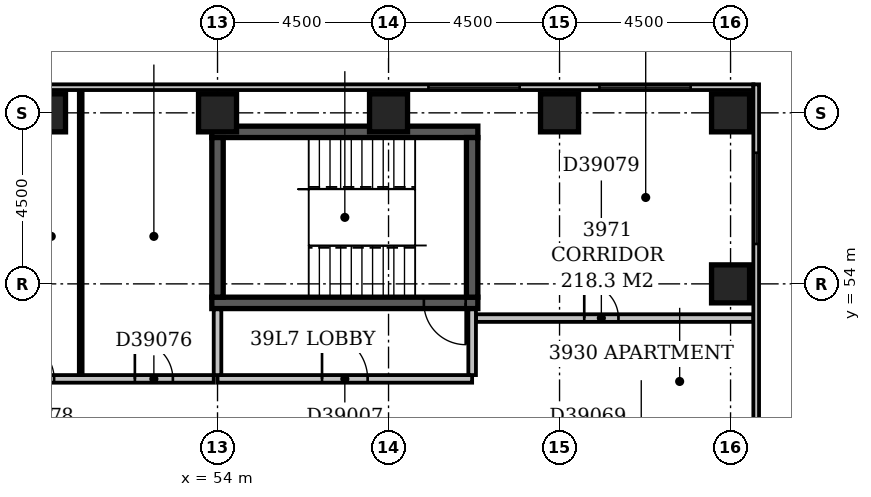
"""IFC4 building model, lengths in metres.
Left out: names, types, materials, properties, quantities, classifications, styles, units other than length and angle.
Written with IfcOpenShell. Run it as: python <this file> out.ifc"""

import sys

from ifc_helpers import new_model, si_unit, direction, frame, frame_2d, origin, origin_2d, place, context, subcontext, project, spatial, rectangle, extrude, element, fill, save


model = new_model("IFC4")
c1 = context("Model", 3, precision=1e-05, world=origin(), true_north=direction((0.0, 1.0)))
c2 = subcontext(c1, "Body", "Model", "MODEL_VIEW")
j1 = project(units=[si_unit("LENGTHUNIT", "METRE"), si_unit("PLANEANGLEUNIT", "RADIAN")], contexts=[c1])
p1 = place(None, origin())
s1 = spatial("IfcSite", under=j1, at=p1, CompositionType="ELEMENT")
p2 = place(p1, origin())
s2 = spatial("IfcBuilding", under=s1, at=p2, CompositionType="ELEMENT")
p3 = place(p2, frame((0.0, 0.0, 155.6)))
s3 = spatial("IfcBuildingStorey", under=s2, at=p3, CompositionType="ELEMENT", Elevation=155.6)
p4 = place(p3, frame((53.85, 53.5, -0.3), z_axis=(0.0, 0.0, 1.0), x_axis=(1.0, 0.0, 0.0)))
e1 = element("IfcWall", 1, at=p4, inside=s3, PredefinedType="SHEAR", context=c2, shape_type="SweptSolid", body=[
    extrude(rectangle(XDim=7.0, YDim=0.3, at=frame_2d((3.5, 0.0))), origin(), (0.0, 0.0, 1.0), 3.6),
])
p5 = place(p4, frame((5.58, 0.0, 0.3)))
e2 = element("IfcOpeningElement", 2, at=p5, cuts=e1, PredefinedType="OPENING", context=c2, shape_type="SweptSolid", body=[
    extrude(rectangle(XDim=1.1, YDim=2.1, at=frame_2d((0.55, 1.05))), frame((0.0, 0.162, 0.0), z_axis=(0.0, -1.0, 0.0), x_axis=(1.0, 0.0, 0.0)), (0.0, 0.0, 1.0), 0.324),
])
p6 = place(p3, frame((53.85, 58.0, -0.3), z_axis=(0.0, 0.0, 1.0), x_axis=(1.0, 0.0, 0.0)))
e3 = element("IfcWall", 3, at=p6, inside=s3, PredefinedType="SHEAR", context=c2, shape_type="SweptSolid", body=[
    extrude(rectangle(XDim=7.0, YDim=0.3, at=frame_2d((3.5, 0.0))), origin(), (0.0, 0.0, 1.0), 3.6),
])
for number, where, z_axis, x_axis in (
    (4, (54.0, 53.65, -0.3), (0.0, 0.0, 1.0), (0.0, 1.0, 0.0)),
    (5, (60.7, 53.65, -0.3), (0.0, 0.0, 1.0), (0.0, 1.0, 0.0)),
):
    element("IfcWall", number, at=place(p3, frame(where, z_axis=z_axis, x_axis=x_axis)), inside=s3, PredefinedType="SHEAR", context=c2, shape_type="SweptSolid", body=[
        extrude(rectangle(XDim=4.2, YDim=0.3, at=frame_2d((2.1, 0.0))), origin(), (0.0, 0.0, 1.0), 3.6),
    ])
for number, where, z_axis, x_axis in (
    (6, (67.5, 54.0, -0.3), (0.0, 0.0, 1.0), (1.0, 0.0, 0.0)),
    (7, (49.5, 58.5, -0.3), (0.0, 0.0, 1.0), (1.0, 0.0, 0.0)),
    (8, (54.0, 58.5, -0.3), (0.0, 0.0, 1.0), (1.0, 0.0, 0.0)),
    (9, (58.5, 58.5, -0.3), (0.0, 0.0, 1.0), (1.0, 0.0, 0.0)),
    (10, (63.0, 58.5, -0.3), (0.0, 0.0, 1.0), (1.0, 0.0, 0.0)),
    (11, (67.5, 58.5, -0.3), (0.0, 0.0, 1.0), (1.0, 0.0, 0.0)),
):
    element("IfcColumn", number, at=place(p3, frame(where, z_axis=z_axis, x_axis=x_axis)), inside=s3, PredefinedType="COLUMN", context=c2, shape_type="SweptSolid", body=[
        extrude(rectangle(XDim=1.0, YDim=1.0, at=origin_2d()), origin(), (0.0, 0.0, 1.0), 3.6),
    ])
p7 = place(p3, frame((68.175, 35.4, 0.0), z_axis=(0.0, 0.0, 1.0), x_axis=(0.0, 1.0, 0.0)))
e12 = element("IfcWall", 12, at=p7, inside=s3, PredefinedType="STANDARD", context=c2, shape_type="SweptSolid", body=[
    extrude(rectangle(XDim=23.85, YDim=0.15, at=frame_2d((11.925, 0.0))), origin(), (0.0, 0.0, 1.0), 2.7),
])
p8 = place(p7, frame((1.65, 0.0, 0.6)))
e13 = element("IfcOpeningElement", 13, at=p8, cuts=e12, PredefinedType="OPENING", context=c2, shape_type="SweptSolid", body=[
    extrude(rectangle(XDim=2.4, YDim=1.8, at=frame_2d((1.2, 0.9))), frame((0.0, 0.087, 0.0), z_axis=(0.0, -1.0, 0.0), x_axis=(1.0, 0.0, 0.0)), (0.0, 0.0, 1.0), 0.174),
])
p9 = place(p7, frame((19.65, 0.0, 0.6)))
e14 = element("IfcOpeningElement", 14, at=p9, cuts=e12, PredefinedType="OPENING", context=c2, shape_type="SweptSolid", body=[
    extrude(rectangle(XDim=2.4, YDim=1.8, at=frame_2d((1.2, 0.9))), frame((0.0, 0.087, 0.0), z_axis=(0.0, -1.0, 0.0), x_axis=(1.0, 0.0, 0.0)), (0.0, 0.0, 1.0), 0.174),
])
p10 = place(p3, frame((68.1, 59.175, 0.0), z_axis=(0.0, 0.0, 1.0), x_axis=(-1.0, 0.0, 0.0)))
e15 = element("IfcWall", 15, at=p10, inside=s3, PredefinedType="STANDARD", context=c2, shape_type="SweptSolid", body=[
    extrude(rectangle(XDim=68.85, YDim=0.15, at=frame_2d((34.425, 0.0))), origin(), (0.0, 0.0, 1.0), 2.7),
])
p11 = place(p10, frame((1.65, 0.0, 0.6)))
e16 = element("IfcOpeningElement", 16, at=p11, cuts=e15, PredefinedType="OPENING", context=c2, shape_type="SweptSolid", body=[
    extrude(rectangle(XDim=2.4, YDim=1.8, at=frame_2d((1.2, 0.9))), frame((0.0, 0.087, 0.0), z_axis=(0.0, -1.0, 0.0), x_axis=(1.0, 0.0, 0.0)), (0.0, 0.0, 1.0), 0.174),
])
p12 = place(p10, frame((6.15, 0.0, 0.6)))
e17 = element("IfcOpeningElement", 17, at=p12, cuts=e15, PredefinedType="OPENING", context=c2, shape_type="SweptSolid", body=[
    extrude(rectangle(XDim=2.4, YDim=1.8, at=frame_2d((1.2, 0.9))), frame((0.0, 0.087, 0.0), z_axis=(0.0, -1.0, 0.0), x_axis=(1.0, 0.0, 0.0)), (0.0, 0.0, 1.0), 0.174),
])
p13 = place(p10, frame((38.847, 0.0, 0.6)))
e18 = element("IfcOpeningElement", 18, at=p13, cuts=e15, PredefinedType="OPENING", context=c2, shape_type="SweptSolid", body=[
    extrude(rectangle(XDim=1.5, YDim=1.8, at=frame_2d((0.75, 0.9))), frame((0.0, 0.087, 0.0), z_axis=(0.0, -1.0, 0.0), x_axis=(1.0, 0.0, 0.0)), (0.0, 0.0, 1.0), 0.174),
])
p14 = place(p3, frame((54.0, 51.5, 0.0), z_axis=(0.0, 0.0, 1.0), x_axis=(1.0, 0.0, 0.0)))
e19 = element("IfcWall", 19, at=p14, inside=s3, PredefinedType="PARTITIONING", context=c2, shape_type="SweptSolid", body=[
    extrude(rectangle(XDim=6.7, YDim=0.2, at=frame_2d((3.35, 0.0))), origin(), (0.0, 0.0, 1.0), 3.3),
])
p15 = place(p14, frame((2.75, 0.0, 0.0)))
e20 = element("IfcOpeningElement", 20, at=p15, cuts=e19, PredefinedType="OPENING", context=c2, shape_type="SweptSolid", body=[
    extrude(rectangle(XDim=1.2, YDim=2.1, at=frame_2d((0.6, 1.05))), frame((0.0, 0.112, 0.0), z_axis=(0.0, -1.0, 0.0), x_axis=(1.0, 0.0, 0.0)), (0.0, 0.0, 1.0), 0.224),
])
p16 = place(p3, frame((60.7, 51.6, 0.0), z_axis=(0.0, 0.0, 1.0), x_axis=(0.0, 1.0, 0.0)))
e21 = element("IfcWall", 21, at=p16, inside=s3, PredefinedType="PARTITIONING", context=c2, shape_type="SweptSolid", body=[
    extrude(rectangle(XDim=1.73, YDim=0.2, at=frame_2d((0.865, 0.0))), origin(), (0.0, 0.0, 1.0), 3.3),
])
p17 = place(p3, frame((54.0, 51.6, 0.0), z_axis=(0.0, 0.0, 1.0), x_axis=(0.0, 1.0, 0.0)))
e22 = element("IfcWall", 22, at=p17, inside=s3, PredefinedType="PARTITIONING", context=c2, shape_type="SweptSolid", body=[
    extrude(rectangle(XDim=1.73, YDim=0.2, at=frame_2d((0.865, 0.0))), origin(), (0.0, 0.0, 1.0), 2.6),
])
p18 = place(p3, frame((44.1, 51.5, 0.0), z_axis=(0.0, 0.0, 1.0), x_axis=(1.0, 0.0, 0.0)))
e23 = element("IfcWall", 23, at=p18, inside=s3, PredefinedType="PARTITIONING", context=c2, shape_type="SweptSolid", body=[
    extrude(rectangle(XDim=9.8, YDim=0.2, at=frame_2d((4.9, 0.0))), origin(), (0.0, 0.0, 1.0), 3.3),
])
p19 = place(p18, frame((7.725, 0.0, 0.0)))
e24 = element("IfcOpeningElement", 24, at=p19, cuts=e23, PredefinedType="OPENING", context=c2, shape_type="SweptSolid", body=[
    extrude(rectangle(XDim=1.0, YDim=2.1, at=frame_2d((0.5, 1.05))), frame((0.0, 0.112, 0.0), z_axis=(0.0, -1.0, 0.0), x_axis=(1.0, 0.0, 0.0)), (0.0, 0.0, 1.0), 0.224),
])
p20 = place(p18, frame((1.075, 0.0, 0.0)))
e25 = element("IfcOpeningElement", 25, at=p20, cuts=e23, PredefinedType="OPENING", context=c2, shape_type="SweptSolid", body=[
    extrude(rectangle(XDim=1.0, YDim=2.1, at=frame_2d((0.5, 1.05))), frame((0.0, 0.112, 0.0), z_axis=(0.0, -1.0, 0.0), x_axis=(1.0, 0.0, 0.0)), (0.0, 0.0, 1.0), 0.224),
])
p21 = place(p18, frame((4.6, 0.0, 0.0)))
e26 = element("IfcOpeningElement", 26, at=p21, cuts=e23, PredefinedType="OPENING", context=c2, shape_type="SweptSolid", body=[
    extrude(rectangle(XDim=1.0, YDim=2.1, at=frame_2d((0.5, 1.05))), frame((0.0, 0.112, 0.0), z_axis=(0.0, -1.0, 0.0), x_axis=(1.0, 0.0, 0.0)), (0.0, 0.0, 1.0), 0.224),
])
p22 = place(p3, frame((50.4, 51.6, 0.0), z_axis=(0.0, 0.0, 1.0), x_axis=(0.0, 1.0, 0.0)))
e27 = element("IfcWall", 27, at=p22, inside=s3, PredefinedType="PARTITIONING", context=c2, shape_type="SweptSolid", body=[
    extrude(rectangle(XDim=7.5, YDim=0.1, at=frame_2d((3.75, 0.0))), origin(), (0.0, 0.0, 1.0), 3.3),
])
p23 = place(p3, frame((60.8, 53.1, 0.0), z_axis=(0.0, 0.0, 1.0), x_axis=(1.0, 0.0, 0.0)))
e28 = element("IfcWall", 28, at=p23, inside=s3, PredefinedType="PARTITIONING", context=c2, shape_type="SweptSolid", body=[
    extrude(rectangle(XDim=7.3, YDim=0.2, at=frame_2d((3.65, 0.0))), origin(), (0.0, 0.0, 1.0), 3.3),
])
p24 = place(p23, frame((2.85, 0.0, 0.0)))
e29 = element("IfcOpeningElement", 29, at=p24, cuts=e28, PredefinedType="OPENING", context=c2, shape_type="SweptSolid", body=[
    extrude(rectangle(XDim=0.9, YDim=2.1, at=frame_2d((0.45, 1.05))), frame((0.0, 0.112, 0.0), z_axis=(0.0, -1.0, 0.0), x_axis=(1.0, 0.0, 0.0)), (0.0, 0.0, 1.0), 0.224),
])
p25 = place(p9, origin())
e30 = element("IfcWindow", 30, at=p25, inside=s3, PartitioningType="SINGLE_PANEL", PredefinedType="WINDOW", context=c2, shape_type="SweptSolid", body=[
    extrude(rectangle(XDim=2.4, YDim=1.8, at=frame_2d((1.2, 0.9))), frame((0.0, 0.03, 0.0), z_axis=(0.0, -1.0, 0.0), x_axis=(1.0, 0.0, 0.0)), (0.0, 0.0, 1.0), 0.06),
])
fill(e14, e30)
p26 = place(p11, origin())
e31 = element("IfcWindow", 31, at=p26, inside=s3, PartitioningType="SINGLE_PANEL", PredefinedType="WINDOW", context=c2, shape_type="SweptSolid", body=[
    extrude(rectangle(XDim=2.4, YDim=1.8, at=frame_2d((1.2, 0.9))), frame((0.0, 0.03, 0.0), z_axis=(0.0, -1.0, 0.0), x_axis=(1.0, 0.0, 0.0)), (0.0, 0.0, 1.0), 0.06),
])
fill(e16, e31)
p27 = place(p12, origin())
e32 = element("IfcWindow", 32, at=p27, inside=s3, PartitioningType="SINGLE_PANEL", PredefinedType="WINDOW", context=c2, shape_type="SweptSolid", body=[
    extrude(rectangle(XDim=2.4, YDim=1.8, at=frame_2d((1.2, 0.9))), frame((0.0, 0.03, 0.0), z_axis=(0.0, -1.0, 0.0), x_axis=(1.0, 0.0, 0.0)), (0.0, 0.0, 1.0), 0.06),
])
fill(e17, e32)
p28 = place(p15, origin())
e33 = element("IfcDoor", 33, at=p28, inside=s3, OperationType="SINGLE_SWING_LEFT", PredefinedType="DOOR", context=c2, shape_type="SweptSolid", body=[
    extrude(rectangle(XDim=1.2, YDim=2.1, at=frame_2d((0.6, 1.05))), frame((0.0, 0.025, 0.0), z_axis=(0.0, -1.0, 0.0), x_axis=(1.0, 0.0, 0.0)), (0.0, 0.0, 1.0), 0.05),
])
fill(e20, e33)
p29 = place(p5, origin())
e34 = element("IfcDoor", 34, at=p29, inside=s3, OperationType="SINGLE_SWING_RIGHT", PredefinedType="DOOR", context=c2, shape_type="SweptSolid", body=[
    extrude(rectangle(XDim=1.1, YDim=2.1, at=frame_2d((0.55, 1.05))), frame((0.0, 0.025, 0.0), z_axis=(0.0, -1.0, 0.0), x_axis=(1.0, 0.0, 0.0)), (0.0, 0.0, 1.0), 0.05),
])
fill(e2, e34)
p30 = place(p19, origin())
e35 = element("IfcDoor", 35, at=p30, inside=s3, OperationType="SINGLE_SWING_LEFT", PredefinedType="DOOR", context=c2, shape_type="SweptSolid", body=[
    extrude(rectangle(XDim=1.0, YDim=2.1, at=frame_2d((0.5, 1.05))), frame((0.0, 0.025, 0.0), z_axis=(0.0, -1.0, 0.0), x_axis=(1.0, 0.0, 0.0)), (0.0, 0.0, 1.0), 0.05),
])
fill(e24, e35)
p31 = place(p21, origin())
e36 = element("IfcDoor", 36, at=p31, inside=s3, OperationType="SINGLE_SWING_LEFT", PredefinedType="DOOR", context=c2, shape_type="SweptSolid", body=[
    extrude(rectangle(XDim=1.0, YDim=2.1, at=frame_2d((0.5, 1.05))), frame((0.0, 0.025, 0.0), z_axis=(0.0, -1.0, 0.0), x_axis=(1.0, 0.0, 0.0)), (0.0, 0.0, 1.0), 0.05),
])
fill(e26, e36)
p32 = place(p24, origin())
e37 = element("IfcDoor", 37, at=p32, inside=s3, OperationType="SINGLE_SWING_LEFT", PredefinedType="DOOR", context=c2, shape_type="SweptSolid", body=[
    extrude(rectangle(XDim=0.9, YDim=2.1, at=frame_2d((0.45, 1.05))), frame((0.0, 0.025, 0.0), z_axis=(0.0, -1.0, 0.0), x_axis=(1.0, 0.0, 0.0)), (0.0, 0.0, 1.0), 0.05),
])
fill(e29, e37)
save(model, sys.argv[1])
